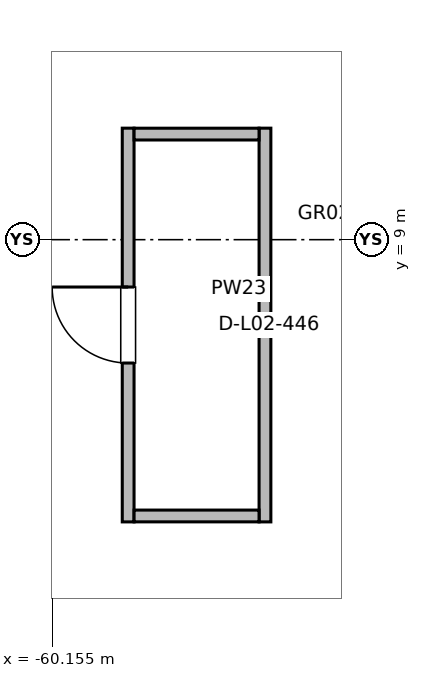
"""IFC4 building model, lengths in metres.
Left out: names, types, materials, properties, quantities, classifications, styles, units other than length and angle.
Written with IfcOpenShell. Run it as: python <this file> out.ifc"""

import sys

from ifc_helpers import new_model, si_unit, direction, frame, frame_2d, origin, place, context, subcontext, project, spatial, rectangle, extrude, element, fill, save


model = new_model("IFC4")
c1 = context("Model", 3, precision=1e-05, world=origin(), true_north=direction((0.0, 1.0)))
c2 = subcontext(c1, "Body", "Model", "MODEL_VIEW")
j1 = project(units=[si_unit("LENGTHUNIT", "METRE"), si_unit("PLANEANGLEUNIT", "RADIAN")], contexts=[c1])
p1 = place(None, origin())
s1 = spatial("IfcSite", under=j1, at=p1, CompositionType="ELEMENT")
p2 = place(p1, origin())
s2 = spatial("IfcBuilding", under=s1, at=p2, CompositionType="ELEMENT")
p3 = place(p2, frame((0.0, 0.0, 6.0)))
s3 = spatial("IfcBuildingStorey", under=s2, at=p3, CompositionType="ELEMENT", Elevation=6.0)
p4 = place(p3, frame((-59.156, 5.287, 0.0), z_axis=(0.0, 0.0, 1.0), x_axis=(0.0, 1.0, 0.0)))
e1 = element("IfcWall", 1, at=p4, inside=s3, PredefinedType="PARTITIONING", context=c2, shape_type="SweptSolid", body=[
    extrude(rectangle(XDim=5.18, YDim=0.155, at=frame_2d((2.59, 0.0))), origin(), (0.0, 0.0, 1.0), 4.42),
])
p5 = place(p4, frame((2.09, 0.0, 0.0)))
e2 = element("IfcOpeningElement", 2, at=p5, cuts=e1, PredefinedType="OPENING", context=c2, shape_type="SweptSolid", body=[
    extrude(rectangle(XDim=1.0, YDim=2.15, at=frame_2d((0.5, 1.075))), frame((0.0, 0.087, 0.0), z_axis=(0.0, -1.0, 0.0), x_axis=(1.0, 0.0, 0.0)), (0.0, 0.0, 1.0), 0.175),
])
p6 = place(p3, frame((-57.356, 5.287, 0.0), z_axis=(0.0, 0.0, 1.0), x_axis=(0.0, 1.0, 0.0)))
e3 = element("IfcWall", 3, at=p6, inside=s3, PredefinedType="PARTITIONING", context=c2, shape_type="SweptSolid", body=[
    extrude(rectangle(XDim=5.18, YDim=0.155, at=frame_2d((2.59, 0.0))), origin(), (0.0, 0.0, 1.0), 4.42),
])
for number, where, z_axis, x_axis in (
    (4, (-59.078, 5.365, 0.0), (0.0, 0.0, 1.0), (1.0, 0.0, 0.0)),
    (5, (-59.078, 10.389, 0.0), (0.0, 0.0, 1.0), (1.0, 0.0, 0.0)),
):
    element("IfcWall", number, at=place(p3, frame(where, z_axis=z_axis, x_axis=x_axis)), inside=s3, PredefinedType="PARTITIONING", context=c2, shape_type="SweptSolid", body=[
        extrude(rectangle(XDim=1.644, YDim=0.155, at=frame_2d((0.822, 0.0))), origin(), (0.0, 0.0, 1.0), 4.42),
    ])
p7 = place(p5, origin())
e6 = element("IfcDoor", 6, at=p7, inside=s3, OperationType="SINGLE_SWING_RIGHT", PredefinedType="DOOR", context=c2, shape_type="SweptSolid", body=[
    extrude(rectangle(XDim=1.0, YDim=2.15, at=frame_2d((0.5, 1.075))), frame((0.0, 0.025, 0.0), z_axis=(0.0, -1.0, 0.0), x_axis=(1.0, 0.0, 0.0)), (0.0, 0.0, 1.0), 0.05),
])
fill(e2, e6)
save(model, sys.argv[1])
